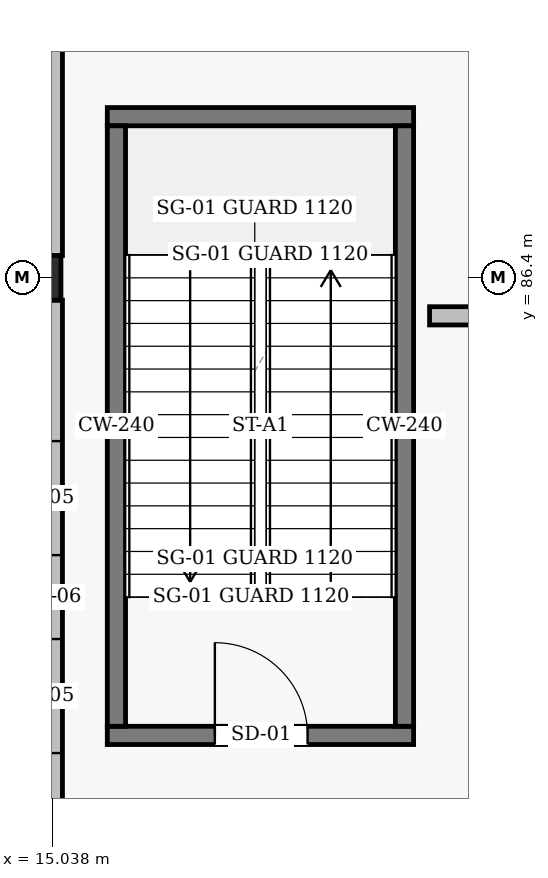
"""IFC4 building model, lengths in metres.
Left out: names, types, materials, properties, quantities, classifications, styles, units other than length and angle.
Written with IfcOpenShell. Run it as: python <this file> out.ifc"""

import sys

from ifc_helpers import new_model, si_unit, direction, frame, frame_2d, origin, origin_2d, place, context, subcontext, project, spatial, rectangle, i_section, extrude, element, fill, save


model = new_model("IFC4")
c1 = context("Model", 3, precision=1e-05, world=origin(), true_north=direction((0.0, 1.0)))
c2 = subcontext(c1, "Body", "Model", "MODEL_VIEW")
j1 = project(units=[si_unit("LENGTHUNIT", "METRE"), si_unit("PLANEANGLEUNIT", "RADIAN")], contexts=[c1])
p1 = place(None, origin())
s1 = spatial("IfcSite", under=j1, at=p1, CompositionType="ELEMENT")
p2 = place(p1, origin())
s2 = spatial("IfcBuilding", under=s1, at=p2, CompositionType="ELEMENT")
p3 = place(p2, origin())
s3 = spatial("IfcBuildingStorey", under=s2, at=p3, CompositionType="ELEMENT", Elevation=0.0)
p4 = place(p3, frame((15.0, 86.4, 0.0), z_axis=(0.0, 0.0, 1.0), x_axis=(1.0, 0.0, 0.0)))
e1 = element("IfcColumn", 1, at=p4, inside=s3, PredefinedType="COLUMN", context=c2, shape_type="SweptSolid", body=[
    extrude(i_section(OverallWidth=0.3, OverallDepth=0.588, WebThickness=0.012, FlangeThickness=0.02, FilletRadius=0.024, at=origin_2d()), origin(), (0.0, 0.0, 1.0), 4.8),
])
p5 = place(p3, frame((15.0, 94.506, 0.0), z_axis=(0.0, 0.0, 1.0), x_axis=(0.0, -1.0, 0.0)))
e2 = element("IfcWall", 2, at=p5, inside=s3, PredefinedType="SOLIDWALL", context=c2, shape_type="SweptSolid", body=[
    extrude(rectangle(XDim=7.812, YDim=0.34, at=frame_2d((3.906, 0.0))), origin(), (0.0, 0.0, 1.0), 4.06),
])
p6 = place(p3, frame((15.0, 86.106, 0.0), z_axis=(0.0, 0.0, 1.0), x_axis=(0.0, -1.0, 0.0)))
e3 = element("IfcWall", 3, at=p6, inside=s3, PredefinedType="SOLIDWALL", context=c2, shape_type="SweptSolid", body=[
    extrude(rectangle(XDim=7.812, YDim=0.34, at=frame_2d((3.906, 0.0))), origin(), (0.0, 0.0, 1.0), 4.06),
])
p7 = place(p6, frame((1.854, 0.0, 0.85)))
e4 = element("IfcOpeningElement", 4, at=p7, cuts=e3, PredefinedType="OPENING", context=c2, shape_type="SweptSolid", body=[
    extrude(rectangle(XDim=1.5, YDim=2.1, at=frame_2d((0.75, 1.05))), frame((0.0, 0.18, 0.0), z_axis=(0.0, -1.0, 0.0), x_axis=(1.0, 0.0, 0.0)), (0.0, 0.0, 1.0), 0.36),
])
p8 = place(p6, frame((4.458, 0.0, 0.85)))
e5 = element("IfcOpeningElement", 5, at=p8, cuts=e3, PredefinedType="OPENING", context=c2, shape_type="SweptSolid", body=[
    extrude(rectangle(XDim=1.5, YDim=2.1, at=frame_2d((0.75, 1.05))), frame((0.0, 0.18, 0.0), z_axis=(0.0, -1.0, 0.0), x_axis=(1.0, 0.0, 0.0)), (0.0, 0.0, 1.0), 0.36),
])
p9 = place(p3, frame((15.76, 80.38, 0.0), z_axis=(0.0, 0.0, 1.0), x_axis=(1.0, 0.0, 0.0)))
e6 = element("IfcWall", 6, at=p9, inside=s3, PredefinedType="SHEAR", context=c2, shape_type="SweptSolid", body=[
    extrude(rectangle(XDim=4.03, YDim=0.24, at=frame_2d((2.015, 0.0))), origin(), (0.0, 0.0, 1.0), 4.56),
])
p10 = place(p9, frame((1.415, 0.0, 0.0)))
e7 = element("IfcOpeningElement", 7, at=p10, cuts=e6, PredefinedType="OPENING", context=c2, shape_type="SweptSolid", body=[
    extrude(rectangle(XDim=1.22, YDim=2.18, at=frame_2d((0.61, 1.09))), frame((0.0, 0.13, 0.0), z_axis=(0.0, -1.0, 0.0), x_axis=(1.0, 0.0, 0.0)), (0.0, 0.0, 1.0), 0.26),
])
p11 = place(p3, frame((15.76, 88.52, 0.0), z_axis=(0.0, 0.0, 1.0), x_axis=(1.0, 0.0, 0.0)))
e8 = element("IfcWall", 8, at=p11, inside=s3, PredefinedType="SHEAR", context=c2, shape_type="SweptSolid", body=[
    extrude(rectangle(XDim=4.03, YDim=0.24, at=frame_2d((2.015, 0.0))), origin(), (0.0, 0.0, 1.0), 4.56),
])
for number, where, z_axis, x_axis in (
    (9, (15.88, 80.5, 0.0), (0.0, 0.0, 1.0), (0.0, 1.0, 0.0)),
    (10, (19.67, 80.5, 0.0), (0.0, 0.0, 1.0), (0.0, 1.0, 0.0)),
):
    element("IfcWall", number, at=place(p3, frame(where, z_axis=z_axis, x_axis=x_axis)), inside=s3, PredefinedType="SHEAR", context=c2, shape_type="SweptSolid", body=[
        extrude(rectangle(XDim=7.9, YDim=0.24, at=frame_2d((3.95, 0.0))), origin(), (0.0, 0.0, 1.0), 4.56),
    ])
p12 = place(p3, frame((20.0, 85.9, 0.0), z_axis=(0.0, 0.0, 1.0), x_axis=(1.0, 0.0, 0.0)))
e11 = element("IfcWall", 11, at=p12, inside=s3, PredefinedType="SOLIDWALL", context=c2, shape_type="SweptSolid", body=[
    extrude(rectangle(XDim=17.2, YDim=0.24, at=frame_2d((8.6, 0.0))), origin(), (0.0, 0.0, 1.0), 4.56),
])
p13 = place(p12, frame((7.85, 0.0, 0.0)))
e12 = element("IfcOpeningElement", 12, at=p13, cuts=e11, PredefinedType="OPENING", context=c2, shape_type="SweptSolid", body=[
    extrude(rectangle(XDim=1.56, YDim=2.25, at=frame_2d((0.78, 1.125))), frame((0.0, 0.13, 0.0), z_axis=(0.0, -1.0, 0.0), x_axis=(1.0, 0.0, 0.0)), (0.0, 0.0, 1.0), 0.26),
])
p14 = place(p10, origin())
e13 = element("IfcDoor", 13, at=p14, inside=s3, OperationType="SINGLE_SWING_LEFT", PredefinedType="DOOR", context=c2, shape_type="SweptSolid", body=[
    extrude(rectangle(XDim=1.22, YDim=2.18, at=frame_2d((0.61, 1.09))), frame((0.0, 0.025, 0.0), z_axis=(0.0, -1.0, 0.0), x_axis=(1.0, 0.0, 0.0)), (0.0, 0.0, 1.0), 0.05),
])
fill(e7, e13)
save(model, sys.argv[1])
